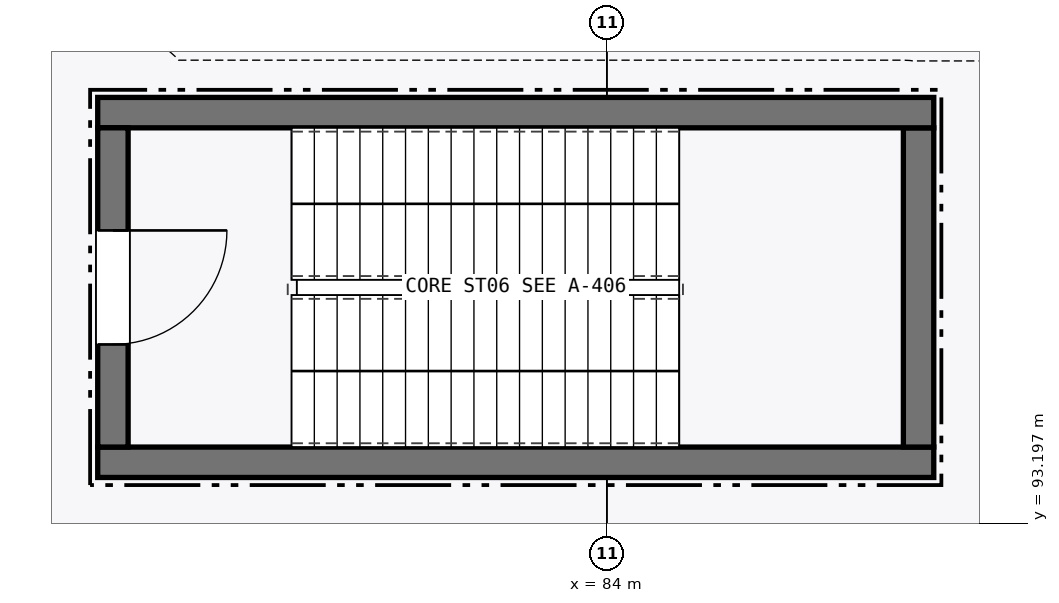
"""IFC4 building model, lengths in metres.
Left out: names, types, materials, properties, quantities, classifications, styles, units other than length and angle.
Written with IfcOpenShell. Run it as: python <this file> out.ifc"""

import sys

from ifc_helpers import new_model, si_unit, direction, frame, frame_2d, origin, place, context, subcontext, project, spatial, rectangle, extrude, element, fill, save


model = new_model("IFC4")
c1 = context("Model", 3, precision=1e-05, world=origin(), true_north=direction((0.0, 1.0)))
c2 = subcontext(c1, "Body", "Model", "MODEL_VIEW")
j1 = project(units=[si_unit("LENGTHUNIT", "METRE"), si_unit("PLANEANGLEUNIT", "RADIAN")], contexts=[c1])
p1 = place(None, origin())
s1 = spatial("IfcSite", under=j1, at=p1, CompositionType="ELEMENT")
p2 = place(p1, origin())
s2 = spatial("IfcBuilding", under=s1, at=p2, CompositionType="ELEMENT")
p3 = place(p2, frame((0.0, 0.0, 6.0)))
s3 = spatial("IfcBuildingStorey", under=s2, at=p3, CompositionType="ELEMENT", Elevation=6.0)
p4 = place(p3, frame((77.3, 94.0, 0.0), z_axis=(0.0, 0.0, 1.0), x_axis=(1.0, 0.0, 0.0)))
e1 = element("IfcWall", 1, at=p4, inside=s3, PredefinedType="SHEAR", context=c2, shape_type="SweptSolid", body=[
    extrude(rectangle(XDim=11.0, YDim=0.4, at=frame_2d((5.5, 0.0))), origin(), (0.0, 0.0, 1.0), 5.145),
])
p5 = place(p3, frame((88.1, 94.2, 0.0), z_axis=(0.0, 0.0, 1.0), x_axis=(0.0, 1.0, 0.0)))
e2 = element("IfcWall", 2, at=p5, inside=s3, PredefinedType="SHEAR", context=c2, shape_type="SweptSolid", body=[
    extrude(rectangle(XDim=4.2, YDim=0.4, at=frame_2d((2.1, 0.0))), origin(), (0.0, 0.0, 1.0), 5.145),
])
p6 = place(p3, frame((88.3, 98.6, 0.0), z_axis=(0.0, 0.0, 1.0), x_axis=(-1.0, 0.0, 0.0)))
e3 = element("IfcWall", 3, at=p6, inside=s3, PredefinedType="SHEAR", context=c2, shape_type="SweptSolid", body=[
    extrude(rectangle(XDim=11.0, YDim=0.4, at=frame_2d((5.5, 0.0))), origin(), (0.0, 0.0, 1.0), 5.145),
])
p7 = place(p3, frame((77.5, 98.4, 0.0), z_axis=(0.0, 0.0, 1.0), x_axis=(0.0, -1.0, 0.0)))
e4 = element("IfcWall", 4, at=p7, inside=s3, PredefinedType="SHEAR", context=c2, shape_type="SweptSolid", body=[
    extrude(rectangle(XDim=4.2, YDim=0.4, at=frame_2d((2.1, 0.0))), origin(), (0.0, 0.0, 1.0), 5.145),
])
p8 = place(p7, frame((1.35, 0.0, 0.0)))
e5 = element("IfcOpeningElement", 5, at=p8, cuts=e4, PredefinedType="OPENING", context=c2, shape_type="SweptSolid", body=[
    extrude(rectangle(XDim=1.5, YDim=2.15, at=frame_2d((0.75, 1.075))), frame((0.0, 0.21, 0.0), z_axis=(0.0, -1.0, 0.0), x_axis=(1.0, 0.0, 0.0)), (0.0, 0.0, 1.0), 0.42),
])
p9 = place(p8, origin())
e6 = element("IfcDoor", 6, at=p9, inside=s3, OperationType="SINGLE_SWING_LEFT", PredefinedType="DOOR", context=c2, shape_type="SweptSolid", body=[
    extrude(rectangle(XDim=1.5, YDim=2.15, at=frame_2d((0.75, 1.075))), frame((0.0, 0.025, 0.0), z_axis=(0.0, -1.0, 0.0), x_axis=(1.0, 0.0, 0.0)), (0.0, 0.0, 1.0), 0.05),
])
fill(e5, e6)
save(model, sys.argv[1])
